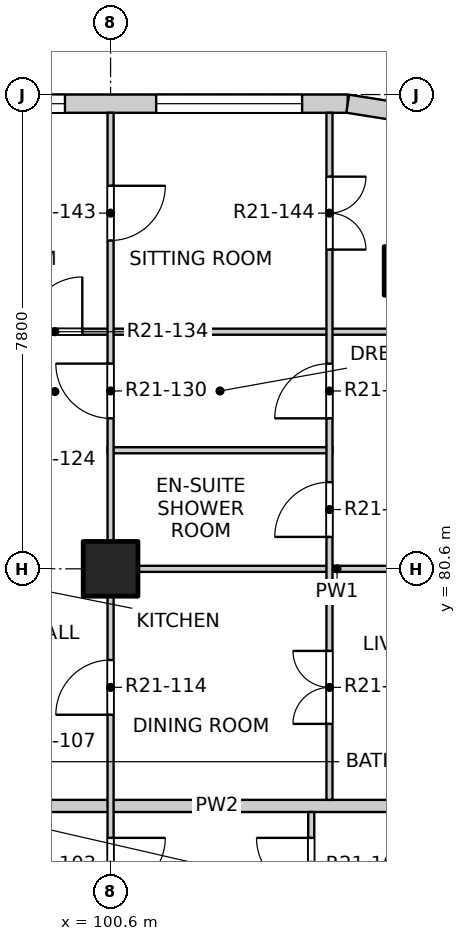
"""IFC4 building model, lengths in metres.
Left out: names, types, materials, properties, quantities, classifications, styles, units other than length and angle.
Written with IfcOpenShell. Run it as: python <this file> out.ifc"""

import sys

from ifc_helpers import new_model, si_unit, direction, frame, frame_2d, origin, origin_2d, place, context, subcontext, project, spatial, rectangle, extrude, element, fill, save


model = new_model("IFC4")
c1 = context("Model", 3, precision=1e-05, world=origin(), true_north=direction((0.0, 1.0)))
c2 = subcontext(c1, "Body", "Model", "MODEL_VIEW")
j1 = project(units=[si_unit("LENGTHUNIT", "METRE"), si_unit("PLANEANGLEUNIT", "RADIAN")], contexts=[c1])
p1 = place(None, origin())
s1 = spatial("IfcSite", under=j1, at=p1, CompositionType="ELEMENT")
p2 = place(p1, origin())
s2 = spatial("IfcBuilding", under=s1, at=p2, CompositionType="ELEMENT")
p3 = place(p2, frame((0.0, 0.0, 221.1)))
s3 = spatial("IfcBuildingStorey", under=s2, at=p3, CompositionType="ELEMENT", Elevation=221.1)
p4 = place(p3, frame((105.5, 85.5, -0.25), z_axis=(0.0, 0.0, 1.0), x_axis=(1.0, 0.0, 0.0)))
e1 = element("IfcColumn", 1, at=p4, inside=s3, PredefinedType="COLUMN", context=c2, shape_type="SweptSolid", body=[
    extrude(rectangle(XDim=0.8, YDim=0.8, at=origin_2d()), origin(), (0.0, 0.0, 1.0), 3.4),
])
p5 = place(p3, frame((100.6, 80.6, -0.25), z_axis=(0.0, 0.0, 1.0), x_axis=(1.0, 0.0, 0.0)))
e2 = element("IfcColumn", 2, at=p5, inside=s3, PredefinedType="COLUMN", context=c2, shape_type="SweptSolid", body=[
    extrude(rectangle(XDim=0.9, YDim=0.9, at=origin_2d()), origin(), (0.0, 0.0, 1.0), 3.4),
])
p6 = place(p3, frame((97.1, 88.25, 0.0), z_axis=(0.0, 0.0, 1.0), x_axis=(1.0, 0.0, 0.0)))
e3 = element("IfcWall", 3, at=p6, inside=s3, PredefinedType="SOLIDWALL", context=c2, shape_type="SweptSolid", body=[
    extrude(rectangle(XDim=7.4, YDim=0.3, at=frame_2d((3.7, 0.0))), origin(), (0.0, 0.0, 1.0), 2.7),
])
p7 = place(p6, frame((0.35, 0.0, 0.9)))
e4 = element("IfcOpeningElement", 4, at=p7, cuts=e3, PredefinedType="OPENING", context=c2, shape_type="SweptSolid", body=[
    extrude(rectangle(XDim=2.4, YDim=1.8, at=frame_2d((1.2, 0.9))), frame((0.0, 0.16, 0.0), z_axis=(0.0, -1.0, 0.0), x_axis=(1.0, 0.0, 0.0)), (0.0, 0.0, 1.0), 0.32),
])
p8 = place(p6, frame((4.25, 0.0, 0.9)))
e5 = element("IfcOpeningElement", 5, at=p8, cuts=e3, PredefinedType="OPENING", context=c2, shape_type="SweptSolid", body=[
    extrude(rectangle(XDim=2.4, YDim=1.8, at=frame_2d((1.2, 0.9))), frame((0.0, 0.16, 0.0), z_axis=(0.0, -1.0, 0.0), x_axis=(1.0, 0.0, 0.0)), (0.0, 0.0, 1.0), 0.32),
])
p9 = place(p3, frame((105.659, 88.066, 0.0), z_axis=(0.0, 0.0, 1.0), x_axis=(-0.987678452879, 0.156496880861, 0.0)))
e6 = element("IfcWall", 6, at=p9, inside=s3, PredefinedType="SOLIDWALL", context=c2, shape_type="SweptSolid", body=[
    extrude(rectangle(XDim=1.173, YDim=0.3, at=frame_2d((0.586, 0.0))), origin(), (0.0, 0.0, 1.0), 2.7),
])
p10 = place(p3, frame((96.6, 76.7, 0.0), z_axis=(0.0, 0.0, 1.0), x_axis=(1.0, 0.0, 0.0)))
e7 = element("IfcWall", 7, at=p10, inside=s3, PredefinedType="PARTITIONING", context=c2, shape_type="SweptSolid", body=[
    extrude(rectangle(XDim=11.5, YDim=0.2, at=frame_2d((5.75, 0.0))), origin(), (0.0, 0.0, 1.0), 2.55),
])
p11 = place(p3, frame((100.55, 80.6, 0.0), z_axis=(0.0, 0.0, 1.0), x_axis=(1.0, 0.0, 0.0)))
e8 = element("IfcWall", 8, at=p11, inside=s3, PredefinedType="PARTITIONING", context=c2, shape_type="SweptSolid", body=[
    extrude(rectangle(XDim=7.55, YDim=0.1, at=frame_2d((3.775, 0.0))), origin(), (0.0, 0.0, 1.0), 3.15),
])
p12 = place(p3, frame((100.55, 82.55, 0.0), z_axis=(0.0, 0.0, 1.0), x_axis=(1.0, 0.0, 0.0)))
e9 = element("IfcWall", 9, at=p12, inside=s3, PredefinedType="PARTITIONING", context=c2, shape_type="SweptSolid", body=[
    extrude(rectangle(XDim=3.7, YDim=0.1, at=frame_2d((1.85, 0.0))), origin(), (0.0, 0.0, 1.0), 3.15),
])
p13 = place(p3, frame((96.6, 84.5, 0.0), z_axis=(0.0, 0.0, 1.0), x_axis=(1.0, 0.0, 0.0)))
e10 = element("IfcWall", 10, at=p13, inside=s3, PredefinedType="PARTITIONING", context=c2, shape_type="SweptSolid", body=[
    extrude(rectangle(XDim=11.5, YDim=0.1, at=frame_2d((5.75, 0.0))), origin(), (0.0, 0.0, 1.0), 3.15),
])
p14 = place(p13, frame((2.635, 0.0, 0.0)))
e11 = element("IfcOpeningElement", 11, at=p14, cuts=e10, PredefinedType="OPENING", context=c2, shape_type="SweptSolid", body=[
    extrude(rectangle(XDim=0.9, YDim=2.1, at=frame_2d((0.45, 1.05))), frame((0.0, 0.06, 0.0), z_axis=(0.0, -1.0, 0.0), x_axis=(1.0, 0.0, 0.0)), (0.0, 0.0, 1.0), 0.12),
])
p15 = place(p3, frame((100.6, 41.9, 0.0), z_axis=(0.0, 0.0, 1.0), x_axis=(0.0, 1.0, 0.0)))
e12 = element("IfcWall", 12, at=p15, inside=s3, PredefinedType="PARTITIONING", context=c2, shape_type="SweptSolid", body=[
    extrude(rectangle(XDim=46.2, YDim=0.1, at=frame_2d((23.1, 0.0))), origin(), (0.0, 0.0, 1.0), 3.15),
])
p16 = place(p15, frame((1.2, 0.0, 0.0)))
e13 = element("IfcOpeningElement", 13, at=p16, cuts=e12, PredefinedType="OPENING", context=c2, shape_type="SweptSolid", body=[
    extrude(rectangle(XDim=0.9, YDim=2.1, at=frame_2d((0.45, 1.05))), frame((0.0, 0.06, 0.0), z_axis=(0.0, -1.0, 0.0), x_axis=(1.0, 0.0, 0.0)), (0.0, 0.0, 1.0), 0.12),
])
p17 = place(p15, frame((6.025, 0.0, 0.0)))
e14 = element("IfcOpeningElement", 14, at=p17, cuts=e12, PredefinedType="OPENING", context=c2, shape_type="SweptSolid", body=[
    extrude(rectangle(XDim=0.9, YDim=2.1, at=frame_2d((0.45, 1.05))), frame((0.0, 0.06, 0.0), z_axis=(0.0, -1.0, 0.0), x_axis=(1.0, 0.0, 0.0)), (0.0, 0.0, 1.0), 0.12),
])
p18 = place(p15, frame((9.0, 0.0, 0.0)))
e15 = element("IfcOpeningElement", 15, at=p18, cuts=e12, PredefinedType="OPENING", context=c2, shape_type="SweptSolid", body=[
    extrude(rectangle(XDim=0.9, YDim=2.1, at=frame_2d((0.45, 1.05))), frame((0.0, 0.06, 0.0), z_axis=(0.0, -1.0, 0.0), x_axis=(1.0, 0.0, 0.0)), (0.0, 0.0, 1.0), 0.12),
])
p19 = place(p15, frame((13.85, 0.0, 0.0)))
e16 = element("IfcOpeningElement", 16, at=p19, cuts=e12, PredefinedType="OPENING", context=c2, shape_type="SweptSolid", body=[
    extrude(rectangle(XDim=0.9, YDim=2.1, at=frame_2d((0.45, 1.05))), frame((0.0, 0.06, 0.0), z_axis=(0.0, -1.0, 0.0), x_axis=(1.0, 0.0, 0.0)), (0.0, 0.0, 1.0), 0.12),
])
p20 = place(p15, frame((16.8, 0.0, 0.0)))
e17 = element("IfcOpeningElement", 17, at=p20, cuts=e12, PredefinedType="OPENING", context=c2, shape_type="SweptSolid", body=[
    extrude(rectangle(XDim=0.9, YDim=2.1, at=frame_2d((0.45, 1.05))), frame((0.0, 0.06, 0.0), z_axis=(0.0, -1.0, 0.0), x_axis=(1.0, 0.0, 0.0)), (0.0, 0.0, 1.0), 0.12),
])
p21 = place(p15, frame((21.625, 0.0, 0.0)))
e18 = element("IfcOpeningElement", 18, at=p21, cuts=e12, PredefinedType="OPENING", context=c2, shape_type="SweptSolid", body=[
    extrude(rectangle(XDim=0.9, YDim=2.1, at=frame_2d((0.45, 1.05))), frame((0.0, 0.06, 0.0), z_axis=(0.0, -1.0, 0.0), x_axis=(1.0, 0.0, 0.0)), (0.0, 0.0, 1.0), 0.12),
])
p22 = place(p15, frame((24.6, 0.0, 0.0)))
e19 = element("IfcOpeningElement", 19, at=p22, cuts=e12, PredefinedType="OPENING", context=c2, shape_type="SweptSolid", body=[
    extrude(rectangle(XDim=0.9, YDim=2.1, at=frame_2d((0.45, 1.05))), frame((0.0, 0.06, 0.0), z_axis=(0.0, -1.0, 0.0), x_axis=(1.0, 0.0, 0.0)), (0.0, 0.0, 1.0), 0.12),
])
p23 = place(p15, frame((29.425, 0.0, 0.0)))
e20 = element("IfcOpeningElement", 20, at=p23, cuts=e12, PredefinedType="OPENING", context=c2, shape_type="SweptSolid", body=[
    extrude(rectangle(XDim=0.9, YDim=2.1, at=frame_2d((0.45, 1.05))), frame((0.0, 0.06, 0.0), z_axis=(0.0, -1.0, 0.0), x_axis=(1.0, 0.0, 0.0)), (0.0, 0.0, 1.0), 0.12),
])
p24 = place(p15, frame((33.375, 0.0, 0.0)))
e21 = element("IfcOpeningElement", 21, at=p24, cuts=e12, PredefinedType="OPENING", context=c2, shape_type="SweptSolid", body=[
    extrude(rectangle(XDim=0.9, YDim=2.1, at=frame_2d((0.45, 1.05))), frame((0.0, 0.06, 0.0), z_axis=(0.0, -1.0, 0.0), x_axis=(1.0, 0.0, 0.0)), (0.0, 0.0, 1.0), 0.12),
])
p25 = place(p15, frame((36.3, 0.0, 0.0)))
e22 = element("IfcOpeningElement", 22, at=p25, cuts=e12, PredefinedType="OPENING", context=c2, shape_type="SweptSolid", body=[
    extrude(rectangle(XDim=0.9, YDim=2.1, at=frame_2d((0.45, 1.05))), frame((0.0, 0.06, 0.0), z_axis=(0.0, -1.0, 0.0), x_axis=(1.0, 0.0, 0.0)), (0.0, 0.0, 1.0), 0.12),
])
p26 = place(p15, frame((41.175, 0.0, 0.0)))
e23 = element("IfcOpeningElement", 23, at=p26, cuts=e12, PredefinedType="OPENING", context=c2, shape_type="SweptSolid", body=[
    extrude(rectangle(XDim=0.9, YDim=2.1, at=frame_2d((0.45, 1.05))), frame((0.0, 0.06, 0.0), z_axis=(0.0, -1.0, 0.0), x_axis=(1.0, 0.0, 0.0)), (0.0, 0.0, 1.0), 0.12),
])
p27 = place(p15, frame((44.1, 0.0, 0.0)))
e24 = element("IfcOpeningElement", 24, at=p27, cuts=e12, PredefinedType="OPENING", context=c2, shape_type="SweptSolid", body=[
    extrude(rectangle(XDim=0.9, YDim=2.1, at=frame_2d((0.45, 1.05))), frame((0.0, 0.06, 0.0), z_axis=(0.0, -1.0, 0.0), x_axis=(1.0, 0.0, 0.0)), (0.0, 0.0, 1.0), 0.12),
])
p28 = place(p3, frame((103.9, 65.1, 0.0), z_axis=(0.0, 0.0, 1.0), x_axis=(0.0, 1.0, 0.0)))
e25 = element("IfcWall", 25, at=p28, inside=s3, PredefinedType="PARTITIONING", context=c2, shape_type="SweptSolid", body=[
    extrude(rectangle(XDim=11.5, YDim=0.1, at=frame_2d((5.75, 0.0))), origin(), (0.0, 0.0, 1.0), 3.15),
])
p29 = place(p28, frame((1.25, 0.0, 0.0)))
e26 = element("IfcOpeningElement", 26, at=p29, cuts=e25, PredefinedType="OPENING", context=c2, shape_type="SweptSolid", body=[
    extrude(rectangle(XDim=1.2, YDim=2.1, at=frame_2d((0.6, 1.05))), frame((0.0, 0.06, 0.0), z_axis=(0.0, -1.0, 0.0), x_axis=(1.0, 0.0, 0.0)), (0.0, 0.0, 1.0), 0.12),
])
p30 = place(p28, frame((4.325, 0.0, 0.0)))
e27 = element("IfcOpeningElement", 27, at=p30, cuts=e25, PredefinedType="OPENING", context=c2, shape_type="SweptSolid", body=[
    extrude(rectangle(XDim=0.9, YDim=2.1, at=frame_2d((0.45, 1.05))), frame((0.0, 0.06, 0.0), z_axis=(0.0, -1.0, 0.0), x_axis=(1.0, 0.0, 0.0)), (0.0, 0.0, 1.0), 0.12),
])
p31 = place(p28, frame((6.275, 0.0, 0.0)))
e28 = element("IfcOpeningElement", 28, at=p31, cuts=e25, PredefinedType="OPENING", context=c2, shape_type="SweptSolid", body=[
    extrude(rectangle(XDim=0.9, YDim=2.1, at=frame_2d((0.45, 1.05))), frame((0.0, 0.06, 0.0), z_axis=(0.0, -1.0, 0.0), x_axis=(1.0, 0.0, 0.0)), (0.0, 0.0, 1.0), 0.12),
])
p32 = place(p28, frame((8.225, 0.0, 0.0)))
e29 = element("IfcOpeningElement", 29, at=p32, cuts=e25, PredefinedType="OPENING", context=c2, shape_type="SweptSolid", body=[
    extrude(rectangle(XDim=0.9, YDim=2.1, at=frame_2d((0.45, 1.05))), frame((0.0, 0.06, 0.0), z_axis=(0.0, -1.0, 0.0), x_axis=(1.0, 0.0, 0.0)), (0.0, 0.0, 1.0), 0.12),
])
p33 = place(p28, frame((10.175, 0.0, 0.0)))
e30 = element("IfcOpeningElement", 30, at=p33, cuts=e25, PredefinedType="OPENING", context=c2, shape_type="SweptSolid", body=[
    extrude(rectangle(XDim=0.9, YDim=2.1, at=frame_2d((0.45, 1.05))), frame((0.0, 0.06, 0.0), z_axis=(0.0, -1.0, 0.0), x_axis=(1.0, 0.0, 0.0)), (0.0, 0.0, 1.0), 0.12),
])
p34 = place(p3, frame((104.2, 76.8, 0.0), z_axis=(0.0, 0.0, 1.0), x_axis=(0.0, 1.0, 0.0)))
e31 = element("IfcWall", 31, at=p34, inside=s3, PredefinedType="PARTITIONING", context=c2, shape_type="SweptSolid", body=[
    extrude(rectangle(XDim=11.3, YDim=0.1, at=frame_2d((5.65, 0.0))), origin(), (0.0, 0.0, 1.0), 3.15),
])
p35 = place(p34, frame((1.25, 0.0, 0.0)))
e32 = element("IfcOpeningElement", 32, at=p35, cuts=e31, PredefinedType="OPENING", context=c2, shape_type="SweptSolid", body=[
    extrude(rectangle(XDim=1.2, YDim=2.1, at=frame_2d((0.6, 1.05))), frame((0.0, 0.06, 0.0), z_axis=(0.0, -1.0, 0.0), x_axis=(1.0, 0.0, 0.0)), (0.0, 0.0, 1.0), 0.12),
])
p36 = place(p34, frame((4.325, 0.0, 0.0)))
e33 = element("IfcOpeningElement", 33, at=p36, cuts=e31, PredefinedType="OPENING", context=c2, shape_type="SweptSolid", body=[
    extrude(rectangle(XDim=0.9, YDim=2.1, at=frame_2d((0.45, 1.05))), frame((0.0, 0.06, 0.0), z_axis=(0.0, -1.0, 0.0), x_axis=(1.0, 0.0, 0.0)), (0.0, 0.0, 1.0), 0.12),
])
p37 = place(p34, frame((6.275, 0.0, 0.0)))
e34 = element("IfcOpeningElement", 34, at=p37, cuts=e31, PredefinedType="OPENING", context=c2, shape_type="SweptSolid", body=[
    extrude(rectangle(XDim=0.9, YDim=2.1, at=frame_2d((0.45, 1.05))), frame((0.0, 0.06, 0.0), z_axis=(0.0, -1.0, 0.0), x_axis=(1.0, 0.0, 0.0)), (0.0, 0.0, 1.0), 0.12),
])
p38 = place(p34, frame((9.05, 0.0, 0.0)))
e35 = element("IfcOpeningElement", 35, at=p38, cuts=e31, PredefinedType="OPENING", context=c2, shape_type="SweptSolid", body=[
    extrude(rectangle(XDim=1.2, YDim=2.1, at=frame_2d((0.6, 1.05))), frame((0.0, 0.06, 0.0), z_axis=(0.0, -1.0, 0.0), x_axis=(1.0, 0.0, 0.0)), (0.0, 0.0, 1.0), 0.12),
])
p39 = place(p7, origin())
e36 = element("IfcWindow", 36, at=p39, inside=s3, PartitioningType="DOUBLE_PANEL_VERTICAL", PredefinedType="WINDOW", context=c2, shape_type="SweptSolid", body=[
    extrude(rectangle(XDim=2.4, YDim=1.8, at=frame_2d((1.2, 0.9))), frame((0.0, 0.03, 0.0), z_axis=(0.0, -1.0, 0.0), x_axis=(1.0, 0.0, 0.0)), (0.0, 0.0, 1.0), 0.06),
])
fill(e4, e36)
p40 = place(p8, origin())
e37 = element("IfcWindow", 37, at=p40, inside=s3, PartitioningType="DOUBLE_PANEL_VERTICAL", PredefinedType="WINDOW", context=c2, shape_type="SweptSolid", body=[
    extrude(rectangle(XDim=2.4, YDim=1.8, at=frame_2d((1.2, 0.9))), frame((0.0, 0.03, 0.0), z_axis=(0.0, -1.0, 0.0), x_axis=(1.0, 0.0, 0.0)), (0.0, 0.0, 1.0), 0.06),
])
fill(e5, e37)
p41 = place(p24, origin())
e38 = element("IfcDoor", 38, at=p41, inside=s3, OperationType="SINGLE_SWING_LEFT", PredefinedType="DOOR", context=c2, shape_type="SweptSolid", body=[
    extrude(rectangle(XDim=0.9, YDim=2.1, at=frame_2d((0.45, 1.05))), frame((0.0, 0.025, 0.0), z_axis=(0.0, -1.0, 0.0), x_axis=(1.0, 0.0, 0.0)), (0.0, 0.0, 1.0), 0.05),
])
fill(e21, e38)
p42 = place(p33, origin())
e39 = element("IfcDoor", 39, at=p42, inside=s3, OperationType="SINGLE_SWING_RIGHT", PredefinedType="DOOR", context=c2, shape_type="SweptSolid", body=[
    extrude(rectangle(XDim=0.9, YDim=2.1, at=frame_2d((0.45, 1.05))), frame((0.0, 0.025, 0.0), z_axis=(0.0, -1.0, 0.0), x_axis=(1.0, 0.0, 0.0)), (0.0, 0.0, 1.0), 0.05),
])
fill(e30, e39)
p43 = place(p25, origin())
e40 = element("IfcDoor", 40, at=p43, inside=s3, OperationType="SINGLE_SWING_LEFT", PredefinedType="DOOR", context=c2, shape_type="SweptSolid", body=[
    extrude(rectangle(XDim=0.9, YDim=2.1, at=frame_2d((0.45, 1.05))), frame((0.0, 0.025, 0.0), z_axis=(0.0, -1.0, 0.0), x_axis=(1.0, 0.0, 0.0)), (0.0, 0.0, 1.0), 0.05),
])
fill(e22, e40)
p44 = place(p35, origin())
e41 = element("IfcDoor", 41, at=p44, inside=s3, OperationType="DOUBLE_DOOR_SINGLE_SWING", PredefinedType="DOOR", context=c2, shape_type="SweptSolid", body=[
    extrude(rectangle(XDim=1.2, YDim=2.1, at=frame_2d((0.6, 1.05))), frame((0.0, 0.025, 0.0), z_axis=(0.0, -1.0, 0.0), x_axis=(1.0, 0.0, 0.0)), (0.0, 0.0, 1.0), 0.05),
])
fill(e32, e41)
p45 = place(p36, origin())
e42 = element("IfcDoor", 42, at=p45, inside=s3, OperationType="SINGLE_SWING_LEFT", PredefinedType="DOOR", context=c2, shape_type="SweptSolid", body=[
    extrude(rectangle(XDim=0.9, YDim=2.1, at=frame_2d((0.45, 1.05))), frame((0.0, 0.025, 0.0), z_axis=(0.0, -1.0, 0.0), x_axis=(1.0, 0.0, 0.0)), (0.0, 0.0, 1.0), 0.05),
])
fill(e33, e42)
p46 = place(p26, origin())
e43 = element("IfcDoor", 43, at=p46, inside=s3, OperationType="SINGLE_SWING_RIGHT", PredefinedType="DOOR", context=c2, shape_type="SweptSolid", body=[
    extrude(rectangle(XDim=0.9, YDim=2.1, at=frame_2d((0.45, 1.05))), frame((0.0, 0.025, 0.0), z_axis=(0.0, -1.0, 0.0), x_axis=(1.0, 0.0, 0.0)), (0.0, 0.0, 1.0), 0.05),
])
fill(e23, e43)
p47 = place(p37, origin())
e44 = element("IfcDoor", 44, at=p47, inside=s3, OperationType="SINGLE_SWING_LEFT", PredefinedType="DOOR", context=c2, shape_type="SweptSolid", body=[
    extrude(rectangle(XDim=0.9, YDim=2.1, at=frame_2d((0.45, 1.05))), frame((0.0, 0.025, 0.0), z_axis=(0.0, -1.0, 0.0), x_axis=(1.0, 0.0, 0.0)), (0.0, 0.0, 1.0), 0.05),
])
fill(e34, e44)
p48 = place(p14, origin())
e45 = element("IfcDoor", 45, at=p48, inside=s3, OperationType="SINGLE_SWING_RIGHT", PredefinedType="DOOR", context=c2, shape_type="SweptSolid", body=[
    extrude(rectangle(XDim=0.9, YDim=2.1, at=frame_2d((0.45, 1.05))), frame((0.0, 0.025, 0.0), z_axis=(0.0, -1.0, 0.0), x_axis=(1.0, 0.0, 0.0)), (0.0, 0.0, 1.0), 0.05),
])
fill(e11, e45)
p49 = place(p27, origin())
e46 = element("IfcDoor", 46, at=p49, inside=s3, OperationType="SINGLE_SWING_LEFT", PredefinedType="DOOR", context=c2, shape_type="SweptSolid", body=[
    extrude(rectangle(XDim=0.9, YDim=2.1, at=frame_2d((0.45, 1.05))), frame((0.0, 0.025, 0.0), z_axis=(0.0, -1.0, 0.0), x_axis=(1.0, 0.0, 0.0)), (0.0, 0.0, 1.0), 0.05),
])
fill(e24, e46)
p50 = place(p38, origin())
e47 = element("IfcDoor", 47, at=p50, inside=s3, OperationType="DOUBLE_DOOR_SINGLE_SWING", PredefinedType="DOOR", context=c2, shape_type="SweptSolid", body=[
    extrude(rectangle(XDim=1.2, YDim=2.1, at=frame_2d((0.6, 1.05))), frame((0.0, 0.025, 0.0), z_axis=(0.0, -1.0, 0.0), x_axis=(1.0, 0.0, 0.0)), (0.0, 0.0, 1.0), 0.05),
])
fill(e35, e47)
save(model, sys.argv[1])
